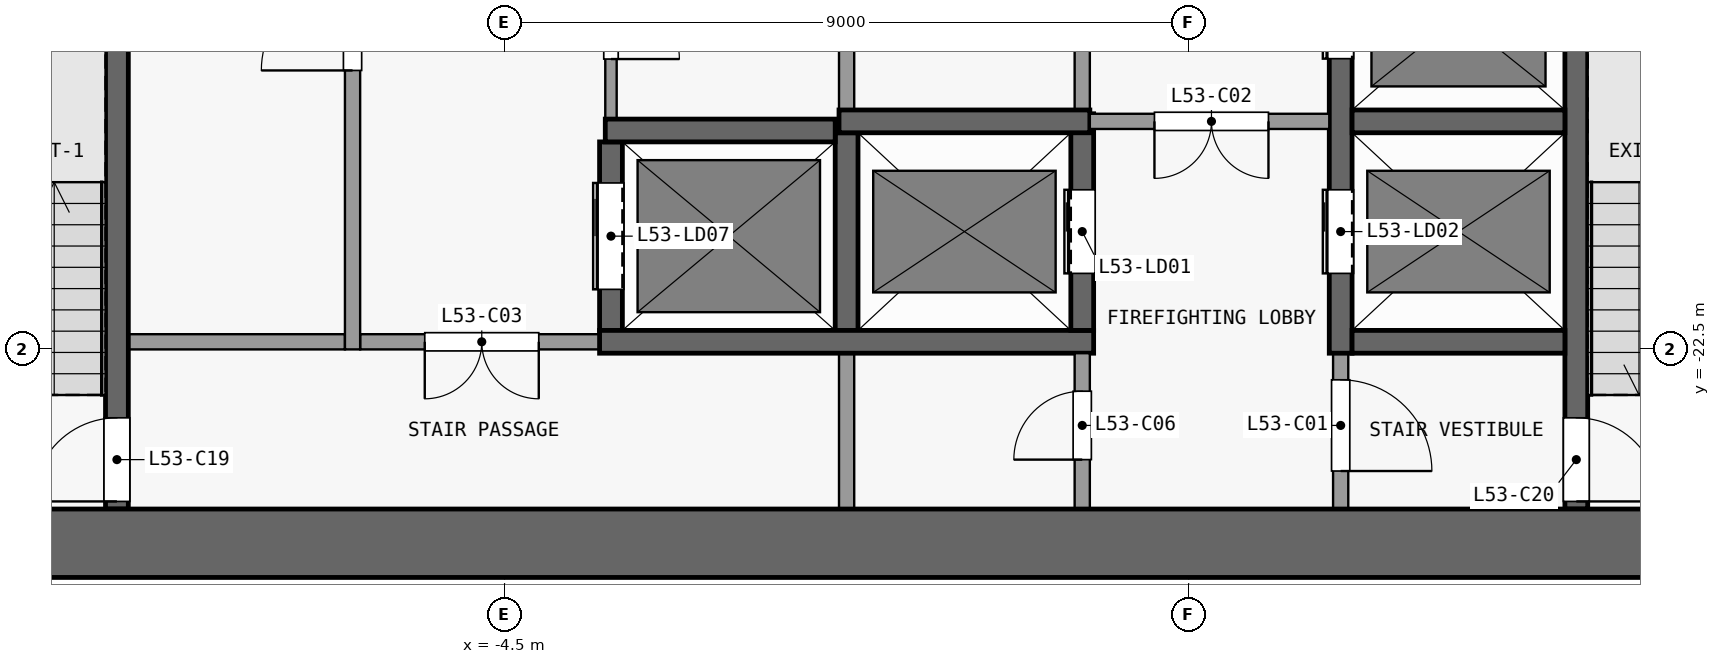
"""IFC4 building model, lengths in metres.
Left out: names, types, materials, properties, quantities, classifications, styles, units other than length and angle.
Written with IfcOpenShell. Run it as: python <this file> out.ifc"""

import sys

from ifc_helpers import new_model, si_unit, direction, frame, frame_2d, origin, place, context, subcontext, project, spatial, rectangle, extrude, element, fill, save


model = new_model("IFC4")
c1 = context("Model", 3, precision=1e-05, world=origin(), true_north=direction((0.0, 1.0)))
c2 = subcontext(c1, "Body", "Model", "MODEL_VIEW")
j1 = project(units=[si_unit("LENGTHUNIT", "METRE"), si_unit("PLANEANGLEUNIT", "RADIAN")], contexts=[c1])
p1 = place(None, origin())
s1 = spatial("IfcSite", under=j1, at=p1, CompositionType="ELEMENT")
p2 = place(p1, origin())
s2 = spatial("IfcBuilding", under=s1, at=p2, CompositionType="ELEMENT")
p3 = place(p2, frame((0.0, 0.0, 212.3)))
s3 = spatial("IfcBuildingStorey", under=s2, at=p3, CompositionType="ELEMENT", Elevation=212.3)
p4 = place(p3, frame((-13.2, -25.05, 0.0), z_axis=(0.0, 0.0, 1.0), x_axis=(1.0, 0.0, 0.0)))
e1 = element("IfcWall", 1, at=p4, inside=s3, PredefinedType="SHEAR", context=c2, shape_type="SweptSolid", body=[
    extrude(rectangle(XDim=26.4, YDim=0.9, at=frame_2d((13.2, 0.0))), origin(), (0.0, 0.0, 1.0), 3.3),
])
p5 = place(p3, frame((-9.45, -22.4, 0.0), z_axis=(0.0, 0.0, 1.0), x_axis=(1.0, 0.0, 0.0)))
e2 = element("IfcWall", 2, at=p5, inside=s3, PredefinedType="PARTITIONING", context=c2, shape_type="SweptSolid", body=[
    extrude(rectangle(XDim=2.85, YDim=0.2, at=frame_2d((1.425, 0.0))), origin(), (0.0, 0.0, 1.0), 3.3),
])
p6 = place(p3, frame((-3.25, -22.4, 0.0), z_axis=(0.0, 0.0, 1.0), x_axis=(-1.0, 0.0, 0.0)))
e3 = element("IfcWall", 3, at=p6, inside=s3, PredefinedType="PARTITIONING", context=c2, shape_type="SweptSolid", body=[
    extrude(rectangle(XDim=3.15, YDim=0.2, at=frame_2d((1.575, 0.0))), origin(), (0.0, 0.0, 1.0), 3.3),
])
p7 = place(p6, frame((0.8, 0.0, 0.0)))
e4 = element("IfcOpeningElement", 4, at=p7, cuts=e3, PredefinedType="OPENING", context=c2, shape_type="SweptSolid", body=[
    extrude(rectangle(XDim=1.5, YDim=2.1, at=frame_2d((0.75, 1.05))), frame((0.0, 0.11, 0.0), z_axis=(0.0, -1.0, 0.0), x_axis=(1.0, 0.0, 0.0)), (0.0, 0.0, 1.0), 0.22),
])
p8 = place(p3, frame((-3.25, -22.4, 0.0), z_axis=(0.0, 0.0, 1.0), x_axis=(1.0, 0.0, 0.0)))
e5 = element("IfcWall", 5, at=p8, inside=s3, PredefinedType="SHEAR", context=c2, shape_type="SweptSolid", body=[
    extrude(rectangle(XDim=6.5, YDim=0.3, at=frame_2d((3.25, 0.0))), origin(), (0.0, 0.0, 1.0), 3.3),
])
p9 = place(p3, frame((6.65, -22.4, 0.0), z_axis=(0.0, 0.0, 1.0), x_axis=(1.0, 0.0, 0.0)))
e6 = element("IfcWall", 6, at=p9, inside=s3, PredefinedType="SHEAR", context=c2, shape_type="SweptSolid", body=[
    extrude(rectangle(XDim=2.8, YDim=0.3, at=frame_2d((1.4, 0.0))), origin(), (0.0, 0.0, 1.0), 3.3),
])
p10 = place(p3, frame((-3.175, -19.62, 0.0), z_axis=(0.0, 0.0, 1.0), x_axis=(1.0, 0.0, 0.0)))
e7 = element("IfcWall", 7, at=p10, inside=s3, PredefinedType="SHEAR", context=c2, shape_type="SweptSolid", body=[
    extrude(rectangle(XDim=3.025, YDim=0.3, at=frame_2d((1.513, 0.0))), origin(), (0.0, 0.0, 1.0), 3.3),
])
p11 = place(p3, frame((-0.1, -19.5, 0.0), z_axis=(0.0, 0.0, 1.0), x_axis=(1.0, 0.0, 0.0)))
e8 = element("IfcWall", 8, at=p11, inside=s3, PredefinedType="SHEAR", context=c2, shape_type="SweptSolid", body=[
    extrude(rectangle(XDim=3.3, YDim=0.3, at=frame_2d((1.65, 0.0))), origin(), (0.0, 0.0, 1.0), 3.3),
])
p12 = place(p3, frame((6.35, -19.5, 0.0), z_axis=(0.0, 0.0, 1.0), x_axis=(-1.0, 0.0, 0.0)))
e9 = element("IfcWall", 9, at=p12, inside=s3, PredefinedType="PARTITIONING", context=c2, shape_type="SweptSolid", body=[
    extrude(rectangle(XDim=3.15, YDim=0.2, at=frame_2d((1.575, 0.0))), origin(), (0.0, 0.0, 1.0), 3.3),
])
p13 = place(p12, frame((0.8, 0.0, 0.0)))
e10 = element("IfcOpeningElement", 10, at=p13, cuts=e9, PredefinedType="OPENING", context=c2, shape_type="SweptSolid", body=[
    extrude(rectangle(XDim=1.5, YDim=2.1, at=frame_2d((0.75, 1.05))), frame((0.0, 0.11, 0.0), z_axis=(0.0, -1.0, 0.0), x_axis=(1.0, 0.0, 0.0)), (0.0, 0.0, 1.0), 0.22),
])
p14 = place(p3, frame((6.65, -19.5, 0.0), z_axis=(0.0, 0.0, 1.0), x_axis=(1.0, 0.0, 0.0)))
e11 = element("IfcWall", 11, at=p14, inside=s3, PredefinedType="SHEAR", context=c2, shape_type="SweptSolid", body=[
    extrude(rectangle(XDim=2.8, YDim=0.3, at=frame_2d((1.4, 0.0))), origin(), (0.0, 0.0, 1.0), 3.3),
])
p15 = place(p3, frame((-9.6, -24.6, 0.0), z_axis=(0.0, 0.0, 1.0), x_axis=(0.0, 1.0, 0.0)))
e12 = element("IfcWall", 12, at=p15, inside=s3, PredefinedType="SHEAR", context=c2, shape_type="SweptSolid", body=[
    extrude(rectangle(XDim=7.7, YDim=0.3, at=frame_2d((3.85, 0.0))), origin(), (0.0, 0.0, 1.0), 3.3),
])
p16 = place(p15, frame((0.1, 0.0, 0.0)))
e13 = element("IfcOpeningElement", 13, at=p16, cuts=e12, PredefinedType="OPENING", context=c2, shape_type="SweptSolid", body=[
    extrude(rectangle(XDim=1.1, YDim=2.1, at=frame_2d((0.55, 1.05))), frame((0.0, 0.16, 0.0), z_axis=(0.0, -1.0, 0.0), x_axis=(1.0, 0.0, 0.0)), (0.0, 0.0, 1.0), 0.32),
])
p17 = place(p3, frame((-6.5, -22.5, 0.0), z_axis=(0.0, 0.0, 1.0), x_axis=(0.0, 1.0, 0.0)))
e14 = element("IfcWall", 14, at=p17, inside=s3, PredefinedType="PARTITIONING", context=c2, shape_type="SweptSolid", body=[
    extrude(rectangle(XDim=8.54, YDim=0.2, at=frame_2d((4.27, 0.0))), origin(), (0.0, 0.0, 1.0), 3.3),
])
p18 = place(p17, frame((3.67, 0.0, 0.0)))
e15 = element("IfcOpeningElement", 15, at=p18, cuts=e14, PredefinedType="OPENING", context=c2, shape_type="SweptSolid", body=[
    extrude(rectangle(XDim=1.2, YDim=2.1, at=frame_2d((0.6, 1.05))), frame((0.0, 0.11, 0.0), z_axis=(0.0, -1.0, 0.0), x_axis=(1.0, 0.0, 0.0)), (0.0, 0.0, 1.0), 0.22),
])
p19 = place(p3, frame((-3.1, -22.25, 0.0), z_axis=(0.0, 0.0, 1.0), x_axis=(0.0, 1.0, 0.0)))
e16 = element("IfcWall", 16, at=p19, inside=s3, PredefinedType="SHEAR", context=c2, shape_type="SweptSolid", body=[
    extrude(rectangle(XDim=2.48, YDim=0.3, at=frame_2d((1.24, 0.0))), origin(), (0.0, 0.0, 1.0), 3.3),
])
p20 = place(p19, frame((0.54, 0.0, 0.0)))
e17 = element("IfcOpeningElement", 17, at=p20, cuts=e16, PredefinedType="OPENING", context=c2, shape_type="SweptSolid", body=[
    extrude(rectangle(XDim=1.4, YDim=2.1, at=frame_2d((0.7, 1.05))), frame((0.0, 0.16, 0.0), z_axis=(0.0, -1.0, 0.0), x_axis=(1.0, 0.0, 0.0)), (0.0, 0.0, 1.0), 0.32),
])
p21 = place(p3, frame((-3.1, -8.5, 0.0), z_axis=(0.0, 0.0, 1.0), x_axis=(0.0, -1.0, 0.0)))
e18 = element("IfcWall", 18, at=p21, inside=s3, PredefinedType="PARTITIONING", context=c2, shape_type="SweptSolid", body=[
    extrude(rectangle(XDim=10.97, YDim=0.15, at=frame_2d((5.485, 0.0))), origin(), (0.0, 0.0, 1.0), 3.3),
])
p22 = place(p21, frame((9.28, 0.0, 0.0)))
e19 = element("IfcOpeningElement", 19, at=p22, cuts=e18, PredefinedType="OPENING", context=c2, shape_type="SweptSolid", body=[
    extrude(rectangle(XDim=0.9, YDim=2.1, at=frame_2d((0.45, 1.05))), frame((0.0, 0.085, 0.0), z_axis=(0.0, -1.0, 0.0), x_axis=(1.0, 0.0, 0.0)), (0.0, 0.0, 1.0), 0.17),
])
p23 = place(p21, frame((3.57, 0.0, 0.0)))
e20 = element("IfcOpeningElement", 20, at=p23, cuts=e18, PredefinedType="OPENING", context=c2, shape_type="SweptSolid", body=[
    extrude(rectangle(XDim=1.2, YDim=2.1, at=frame_2d((0.6, 1.05))), frame((0.0, 0.085, 0.0), z_axis=(0.0, -1.0, 0.0), x_axis=(1.0, 0.0, 0.0)), (0.0, 0.0, 1.0), 0.17),
])
p24 = place(p3, frame((0.0, -24.6, 0.0), z_axis=(0.0, 0.0, 1.0), x_axis=(0.0, 1.0, 0.0)))
e21 = element("IfcWall", 21, at=p24, inside=s3, PredefinedType="PARTITIONING", context=c2, shape_type="SweptSolid", body=[
    extrude(rectangle(XDim=2.05, YDim=0.2, at=frame_2d((1.025, 0.0))), origin(), (0.0, 0.0, 1.0), 3.3),
])
p25 = place(p3, frame((0.0, -22.25, 0.0), z_axis=(0.0, 0.0, 1.0), x_axis=(0.0, 1.0, 0.0)))
e22 = element("IfcWall", 22, at=p25, inside=s3, PredefinedType="SHEAR", context=c2, shape_type="SweptSolid", body=[
    extrude(rectangle(XDim=2.6, YDim=0.3, at=frame_2d((1.3, 0.0))), origin(), (0.0, 0.0, 1.0), 3.3),
])
p26 = place(p3, frame((0.0, -19.35, 0.0), z_axis=(0.0, 0.0, 1.0), x_axis=(0.0, 1.0, 0.0)))
e23 = element("IfcWall", 23, at=p26, inside=s3, PredefinedType="PARTITIONING", context=c2, shape_type="SweptSolid", body=[
    extrude(rectangle(XDim=8.2, YDim=0.2, at=frame_2d((4.1, 0.0))), origin(), (0.0, 0.0, 1.0), 3.3),
])
p27 = place(p3, frame((3.1, -24.6, 0.0), z_axis=(0.0, 0.0, 1.0), x_axis=(0.0, 1.0, 0.0)))
e24 = element("IfcWall", 24, at=p27, inside=s3, PredefinedType="PARTITIONING", context=c2, shape_type="SweptSolid", body=[
    extrude(rectangle(XDim=2.05, YDim=0.2, at=frame_2d((1.025, 0.0))), origin(), (0.0, 0.0, 1.0), 3.3),
])
p28 = place(p27, frame((0.65, 0.0, 0.0)))
e25 = element("IfcOpeningElement", 25, at=p28, cuts=e24, PredefinedType="OPENING", context=c2, shape_type="SweptSolid", body=[
    extrude(rectangle(XDim=0.9, YDim=2.1, at=frame_2d((0.45, 1.05))), frame((0.0, 0.11, 0.0), z_axis=(0.0, -1.0, 0.0), x_axis=(1.0, 0.0, 0.0)), (0.0, 0.0, 1.0), 0.22),
])
p29 = place(p3, frame((3.1, -22.25, 0.0), z_axis=(0.0, 0.0, 1.0), x_axis=(0.0, 1.0, 0.0)))
e26 = element("IfcWall", 26, at=p29, inside=s3, PredefinedType="SHEAR", context=c2, shape_type="SweptSolid", body=[
    extrude(rectangle(XDim=2.85, YDim=0.3, at=frame_2d((1.425, 0.0))), origin(), (0.0, 0.0, 1.0), 3.3),
])
p30 = place(p29, frame((0.75, 0.0, 0.0)))
e27 = element("IfcOpeningElement", 27, at=p30, cuts=e26, PredefinedType="OPENING", context=c2, shape_type="SweptSolid", body=[
    extrude(rectangle(XDim=1.1, YDim=2.1, at=frame_2d((0.55, 1.05))), frame((0.0, 0.16, 0.0), z_axis=(0.0, -1.0, 0.0), x_axis=(1.0, 0.0, 0.0)), (0.0, 0.0, 1.0), 0.32),
])
p31 = place(p3, frame((3.1, -19.6, 0.0), z_axis=(0.0, 0.0, 1.0), x_axis=(0.0, 1.0, 0.0)))
e28 = element("IfcWall", 28, at=p31, inside=s3, PredefinedType="PARTITIONING", context=c2, shape_type="SweptSolid", body=[
    extrude(rectangle(XDim=8.45, YDim=0.2, at=frame_2d((4.225, 0.0))), origin(), (0.0, 0.0, 1.0), 3.3),
])
p32 = place(p31, frame((3.625, 0.0, 0.0)))
e29 = element("IfcOpeningElement", 29, at=p32, cuts=e28, PredefinedType="OPENING", context=c2, shape_type="SweptSolid", body=[
    extrude(rectangle(XDim=1.2, YDim=2.1, at=frame_2d((0.6, 1.05))), frame((0.0, 0.11, 0.0), z_axis=(0.0, -1.0, 0.0), x_axis=(1.0, 0.0, 0.0)), (0.0, 0.0, 1.0), 0.22),
])
p33 = place(p3, frame((6.5, -22.55, 0.0), z_axis=(0.0, 0.0, 1.0), x_axis=(0.0, -1.0, 0.0)))
e30 = element("IfcWall", 30, at=p33, inside=s3, PredefinedType="PARTITIONING", context=c2, shape_type="SweptSolid", body=[
    extrude(rectangle(XDim=2.05, YDim=0.2, at=frame_2d((1.025, 0.0))), origin(), (0.0, 0.0, 1.0), 3.3),
])
p34 = place(p33, frame((0.35, 0.0, 0.0)))
e31 = element("IfcOpeningElement", 31, at=p34, cuts=e30, PredefinedType="OPENING", context=c2, shape_type="SweptSolid", body=[
    extrude(rectangle(XDim=1.2, YDim=2.1, at=frame_2d((0.6, 1.05))), frame((0.0, 0.11, 0.0), z_axis=(0.0, -1.0, 0.0), x_axis=(1.0, 0.0, 0.0)), (0.0, 0.0, 1.0), 0.22),
])
p35 = place(p3, frame((6.5, -22.55, 0.0), z_axis=(0.0, 0.0, 1.0), x_axis=(0.0, 1.0, 0.0)))
e32 = element("IfcWall", 32, at=p35, inside=s3, PredefinedType="SHEAR", context=c2, shape_type="SweptSolid", body=[
    extrude(rectangle(XDim=14.05, YDim=0.3, at=frame_2d((7.025, 0.0))), origin(), (0.0, 0.0, 1.0), 3.3),
])
p36 = place(p35, frame((1.05, 0.0, 0.0)))
e33 = element("IfcOpeningElement", 33, at=p36, cuts=e32, PredefinedType="OPENING", context=c2, shape_type="SweptSolid", body=[
    extrude(rectangle(XDim=1.1, YDim=2.1, at=frame_2d((0.55, 1.05))), frame((0.0, 0.16, 0.0), z_axis=(0.0, -1.0, 0.0), x_axis=(1.0, 0.0, 0.0)), (0.0, 0.0, 1.0), 0.32),
])
p37 = place(p35, frame((3.875, 0.0, 0.0)))
e34 = element("IfcOpeningElement", 34, at=p37, cuts=e32, PredefinedType="OPENING", context=c2, shape_type="SweptSolid", body=[
    extrude(rectangle(XDim=1.1, YDim=2.1, at=frame_2d((0.55, 1.05))), frame((0.0, 0.16, 0.0), z_axis=(0.0, -1.0, 0.0), x_axis=(1.0, 0.0, 0.0)), (0.0, 0.0, 1.0), 0.32),
])
p38 = place(p35, frame((6.625, 0.0, 0.0)))
e35 = element("IfcOpeningElement", 35, at=p38, cuts=e32, PredefinedType="OPENING", context=c2, shape_type="SweptSolid", body=[
    extrude(rectangle(XDim=1.1, YDim=2.1, at=frame_2d((0.55, 1.05))), frame((0.0, 0.16, 0.0), z_axis=(0.0, -1.0, 0.0), x_axis=(1.0, 0.0, 0.0)), (0.0, 0.0, 1.0), 0.32),
])
p39 = place(p35, frame((9.375, 0.0, 0.0)))
e36 = element("IfcOpeningElement", 36, at=p39, cuts=e32, PredefinedType="OPENING", context=c2, shape_type="SweptSolid", body=[
    extrude(rectangle(XDim=1.1, YDim=2.1, at=frame_2d((0.55, 1.05))), frame((0.0, 0.16, 0.0), z_axis=(0.0, -1.0, 0.0), x_axis=(1.0, 0.0, 0.0)), (0.0, 0.0, 1.0), 0.32),
])
p40 = place(p35, frame((12.125, 0.0, 0.0)))
e37 = element("IfcOpeningElement", 37, at=p40, cuts=e32, PredefinedType="OPENING", context=c2, shape_type="SweptSolid", body=[
    extrude(rectangle(XDim=1.1, YDim=2.1, at=frame_2d((0.55, 1.05))), frame((0.0, 0.16, 0.0), z_axis=(0.0, -1.0, 0.0), x_axis=(1.0, 0.0, 0.0)), (0.0, 0.0, 1.0), 0.32),
])
p41 = place(p3, frame((9.6, -16.9, 0.0), z_axis=(0.0, 0.0, 1.0), x_axis=(0.0, -1.0, 0.0)))
e38 = element("IfcWall", 38, at=p41, inside=s3, PredefinedType="SHEAR", context=c2, shape_type="SweptSolid", body=[
    extrude(rectangle(XDim=7.7, YDim=0.3, at=frame_2d((3.85, 0.0))), origin(), (0.0, 0.0, 1.0), 3.3),
])
p42 = place(p41, frame((6.5, 0.0, 0.0)))
e39 = element("IfcOpeningElement", 39, at=p42, cuts=e38, PredefinedType="OPENING", context=c2, shape_type="SweptSolid", body=[
    extrude(rectangle(XDim=1.1, YDim=2.1, at=frame_2d((0.55, 1.05))), frame((0.0, 0.16, 0.0), z_axis=(0.0, -1.0, 0.0), x_axis=(1.0, 0.0, 0.0)), (0.0, 0.0, 1.0), 0.32),
])
p43 = place(p30, origin())
e40 = element("IfcDoor", 40, at=p43, inside=s3, OperationType="DOUBLE_DOOR_SLIDING", PredefinedType="DOOR", context=c2, shape_type="SweptSolid", body=[
    extrude(rectangle(XDim=1.1, YDim=2.1, at=frame_2d((0.55, 1.05))), frame((0.0, 0.025, 0.0), z_axis=(0.0, -1.0, 0.0), x_axis=(1.0, 0.0, 0.0)), (0.0, 0.0, 1.0), 0.05),
])
fill(e27, e40)
p44 = place(p36, origin())
e41 = element("IfcDoor", 41, at=p44, inside=s3, OperationType="DOUBLE_DOOR_SLIDING", PredefinedType="DOOR", context=c2, shape_type="SweptSolid", body=[
    extrude(rectangle(XDim=1.1, YDim=2.1, at=frame_2d((0.55, 1.05))), frame((0.0, 0.025, 0.0), z_axis=(0.0, -1.0, 0.0), x_axis=(1.0, 0.0, 0.0)), (0.0, 0.0, 1.0), 0.05),
])
fill(e33, e41)
p45 = place(p37, origin())
e42 = element("IfcDoor", 42, at=p45, inside=s3, OperationType="DOUBLE_DOOR_SLIDING", PredefinedType="DOOR", context=c2, shape_type="SweptSolid", body=[
    extrude(rectangle(XDim=1.1, YDim=2.1, at=frame_2d((0.55, 1.05))), frame((0.0, 0.025, 0.0), z_axis=(0.0, -1.0, 0.0), x_axis=(1.0, 0.0, 0.0)), (0.0, 0.0, 1.0), 0.05),
])
fill(e34, e42)
p46 = place(p20, origin())
e43 = element("IfcDoor", 43, at=p46, inside=s3, OperationType="DOUBLE_DOOR_SLIDING", PredefinedType="DOOR", context=c2, shape_type="SweptSolid", body=[
    extrude(rectangle(XDim=1.4, YDim=2.1, at=frame_2d((0.7, 1.05))), frame((0.0, 0.025, 0.0), z_axis=(0.0, -1.0, 0.0), x_axis=(1.0, 0.0, 0.0)), (0.0, 0.0, 1.0), 0.05),
])
fill(e17, e43)
p47 = place(p34, origin())
e44 = element("IfcDoor", 44, at=p47, inside=s3, OperationType="SINGLE_SWING_RIGHT", PredefinedType="DOOR", context=c2, shape_type="SweptSolid", body=[
    extrude(rectangle(XDim=1.2, YDim=2.1, at=frame_2d((0.6, 1.05))), frame((0.0, 0.025, 0.0), z_axis=(0.0, -1.0, 0.0), x_axis=(1.0, 0.0, 0.0)), (0.0, 0.0, 1.0), 0.05),
])
fill(e31, e44)
p48 = place(p13, origin())
e45 = element("IfcDoor", 45, at=p48, inside=s3, OperationType="DOUBLE_DOOR_SINGLE_SWING", PredefinedType="DOOR", context=c2, shape_type="SweptSolid", body=[
    extrude(rectangle(XDim=1.5, YDim=2.1, at=frame_2d((0.75, 1.05))), frame((0.0, 0.025, 0.0), z_axis=(0.0, -1.0, 0.0), x_axis=(1.0, 0.0, 0.0)), (0.0, 0.0, 1.0), 0.05),
])
fill(e10, e45)
p49 = place(p7, origin())
e46 = element("IfcDoor", 46, at=p49, inside=s3, OperationType="DOUBLE_DOOR_SINGLE_SWING", PredefinedType="DOOR", context=c2, shape_type="SweptSolid", body=[
    extrude(rectangle(XDim=1.5, YDim=2.1, at=frame_2d((0.75, 1.05))), frame((0.0, 0.025, 0.0), z_axis=(0.0, -1.0, 0.0), x_axis=(1.0, 0.0, 0.0)), (0.0, 0.0, 1.0), 0.05),
])
fill(e4, e46)
p50 = place(p28, origin())
e47 = element("IfcDoor", 47, at=p50, inside=s3, OperationType="SINGLE_SWING_LEFT", PredefinedType="DOOR", context=c2, shape_type="SweptSolid", body=[
    extrude(rectangle(XDim=0.9, YDim=2.1, at=frame_2d((0.45, 1.05))), frame((0.0, 0.025, 0.0), z_axis=(0.0, -1.0, 0.0), x_axis=(1.0, 0.0, 0.0)), (0.0, 0.0, 1.0), 0.05),
])
fill(e25, e47)
p51 = place(p18, origin())
e48 = element("IfcDoor", 48, at=p51, inside=s3, OperationType="SINGLE_SWING_LEFT", PredefinedType="DOOR", context=c2, shape_type="SweptSolid", body=[
    extrude(rectangle(XDim=1.2, YDim=2.1, at=frame_2d((0.6, 1.05))), frame((0.0, 0.025, 0.0), z_axis=(0.0, -1.0, 0.0), x_axis=(1.0, 0.0, 0.0)), (0.0, 0.0, 1.0), 0.05),
])
fill(e15, e48)
p52 = place(p22, origin())
e49 = element("IfcDoor", 49, at=p52, inside=s3, OperationType="SINGLE_SWING_RIGHT", PredefinedType="DOOR", context=c2, shape_type="SweptSolid", body=[
    extrude(rectangle(XDim=0.9, YDim=2.1, at=frame_2d((0.45, 1.05))), frame((0.0, 0.025, 0.0), z_axis=(0.0, -1.0, 0.0), x_axis=(1.0, 0.0, 0.0)), (0.0, 0.0, 1.0), 0.05),
])
fill(e19, e49)
p53 = place(p16, origin())
e50 = element("IfcDoor", 50, at=p53, inside=s3, OperationType="SINGLE_SWING_LEFT", PredefinedType="DOOR", context=c2, shape_type="SweptSolid", body=[
    extrude(rectangle(XDim=1.1, YDim=2.1, at=frame_2d((0.55, 1.05))), frame((0.0, 0.025, 0.0), z_axis=(0.0, -1.0, 0.0), x_axis=(1.0, 0.0, 0.0)), (0.0, 0.0, 1.0), 0.05),
])
fill(e13, e50)
p54 = place(p42, origin())
e51 = element("IfcDoor", 51, at=p54, inside=s3, OperationType="SINGLE_SWING_RIGHT", PredefinedType="DOOR", context=c2, shape_type="SweptSolid", body=[
    extrude(rectangle(XDim=1.1, YDim=2.1, at=frame_2d((0.55, 1.05))), frame((0.0, 0.025, 0.0), z_axis=(0.0, -1.0, 0.0), x_axis=(1.0, 0.0, 0.0)), (0.0, 0.0, 1.0), 0.05),
])
fill(e39, e51)
save(model, sys.argv[1])
